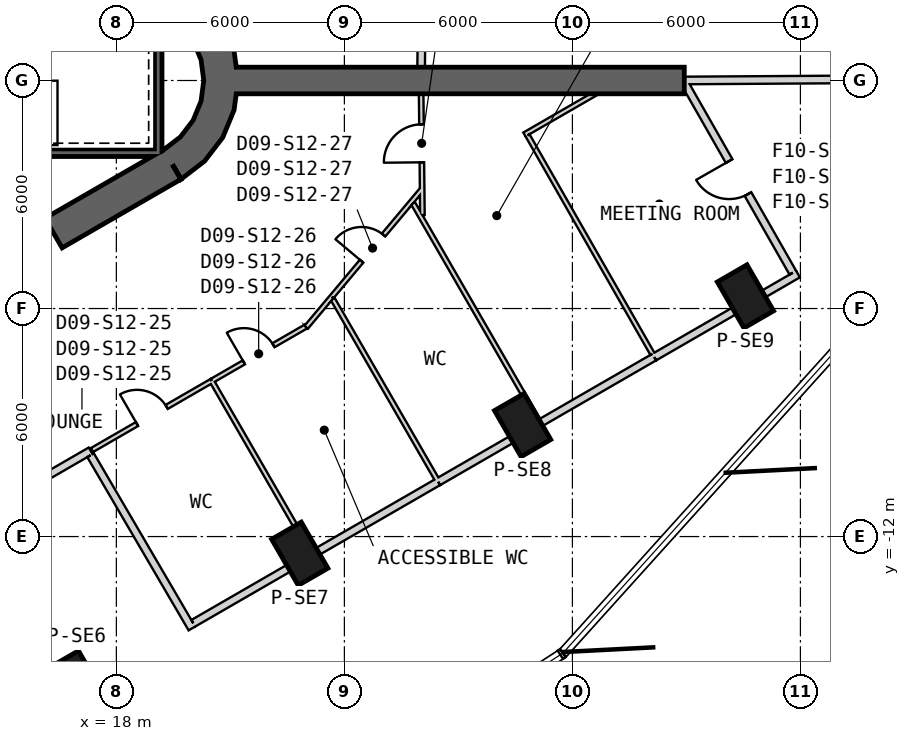
"""IFC4 building model, lengths in metres.
Left out: names, types, materials, properties, quantities, classifications, styles, units other than length and angle.
Written with IfcOpenShell. Run it as: python <this file> out.ifc"""

import sys

from ifc_helpers import new_model, si_unit, direction, frame, frame_2d, origin, origin_2d, place, context, subcontext, project, spatial, polyline, rectangle, outline, extrude, element, fill, save


model = new_model("IFC4")
c1 = context("Model", 3, precision=1e-05, world=origin(), true_north=direction((0.0, 1.0)))
c2 = subcontext(c1, "Body", "Model", "MODEL_VIEW")
j1 = project(units=[si_unit("LENGTHUNIT", "METRE"), si_unit("PLANEANGLEUNIT", "RADIAN")], contexts=[c1])
p1 = place(None, origin())
s1 = spatial("IfcSite", under=j1, at=p1, CompositionType="ELEMENT")
p2 = place(p1, origin())
s2 = spatial("IfcBuilding", under=s1, at=p2, CompositionType="ELEMENT")
p3 = place(p2, frame((0.0, 0.0, 205.2)))
s3 = spatial("IfcBuildingStorey", under=s2, at=p3, CompositionType="ELEMENT", Elevation=205.2)
for number, where, z_axis, x_axis in (
    (1, (16.962, -15.838, 0.0), (0.0, 0.0, 1.0), (0.5, -0.866, 0.0)),
    (2, (22.826, -12.452, 0.0), (0.0, 0.0, 1.0), (0.5, -0.866, 0.0)),
    (3, (28.69, -9.067, 0.0), (0.0, 0.0, 1.0), (0.5, -0.866, 0.0)),
    (4, (34.554, -5.681, 0.0), (0.0, 0.0, 1.0), (0.5, -0.866, 0.0)),
):
    element("IfcColumn", number, at=place(p3, frame(where, z_axis=z_axis, x_axis=x_axis)), inside=s3, PredefinedType="COLUMN", context=c2, shape_type="SweptSolid", body=[
        extrude(rectangle(XDim=1.4, YDim=0.9, at=origin_2d()), origin(), (0.0, 0.0, 1.0), 4.0),
    ])
p4 = place(p3, frame((-7.825, -17.97, 0.0), z_axis=(0.0, 0.0, 1.0), x_axis=(0.866028369851, 0.499994862586, 0.0)))
e5 = element("IfcWall", 5, at=p4, inside=s3, PredefinedType="SHEAR", context=c2, shape_type="SweptSolid", body=[
    extrude(rectangle(XDim=31.523, YDim=0.9, at=frame_2d((15.762, 0.0))), origin(), (0.0, 0.0, 1.0), 4.0),
])
p5 = place(p4, frame((7.062, 0.0, 0.0)))
e6 = element("IfcOpeningElement", 6, at=p5, cuts=e5, PredefinedType="OPENING", context=c2, shape_type="SweptSolid", body=[
    extrude(rectangle(XDim=1.2, YDim=2.4, at=frame_2d((0.6, 1.2))), frame((0.0, 0.46, 0.0), z_axis=(0.0, -1.0, 0.0), x_axis=(1.0, 0.0, 0.0)), (0.0, 0.0, 1.0), 0.92),
])
p6 = place(p4, frame((9.762, 0.0, 0.0)))
e7 = element("IfcOpeningElement", 7, at=p6, cuts=e5, PredefinedType="OPENING", context=c2, shape_type="SweptSolid", body=[
    extrude(rectangle(XDim=1.2, YDim=2.4, at=frame_2d((0.6, 1.2))), frame((0.0, 0.46, 0.0), z_axis=(0.0, -1.0, 0.0), x_axis=(1.0, 0.0, 0.0)), (0.0, 0.0, 1.0), 0.92),
])
p7 = place(p4, frame((12.462, 0.0, 0.0)))
e8 = element("IfcOpeningElement", 8, at=p7, cuts=e5, PredefinedType="OPENING", context=c2, shape_type="SweptSolid", body=[
    extrude(rectangle(XDim=1.2, YDim=2.4, at=frame_2d((0.6, 1.2))), frame((0.0, 0.46, 0.0), z_axis=(0.0, -1.0, 0.0), x_axis=(1.0, 0.0, 0.0)), (0.0, 0.0, 1.0), 0.92),
])
p8 = place(p4, frame((15.162, 0.0, 0.0)))
e9 = element("IfcOpeningElement", 9, at=p8, cuts=e5, PredefinedType="OPENING", context=c2, shape_type="SweptSolid", body=[
    extrude(rectangle(XDim=1.2, YDim=2.4, at=frame_2d((0.6, 1.2))), frame((0.0, 0.46, 0.0), z_axis=(0.0, -1.0, 0.0), x_axis=(1.0, 0.0, 0.0)), (0.0, 0.0, 1.0), 0.92),
])
p9 = place(p4, frame((17.862, 0.0, 0.0)))
e10 = element("IfcOpeningElement", 10, at=p9, cuts=e5, PredefinedType="OPENING", context=c2, shape_type="SweptSolid", body=[
    extrude(rectangle(XDim=1.2, YDim=2.4, at=frame_2d((0.6, 1.2))), frame((0.0, 0.46, 0.0), z_axis=(0.0, -1.0, 0.0), x_axis=(1.0, 0.0, 0.0)), (0.0, 0.0, 1.0), 0.92),
])
p10 = place(p4, frame((20.562, 0.0, 0.0)))
e11 = element("IfcOpeningElement", 11, at=p10, cuts=e5, PredefinedType="OPENING", context=c2, shape_type="SweptSolid", body=[
    extrude(rectangle(XDim=1.2, YDim=2.4, at=frame_2d((0.6, 1.2))), frame((0.0, 0.46, 0.0), z_axis=(0.0, -1.0, 0.0), x_axis=(1.0, 0.0, 0.0)), (0.0, 0.0, 1.0), 0.92),
])
p11 = place(p4, frame((26.712, 0.0, 0.0)))
e12 = element("IfcOpeningElement", 12, at=p11, cuts=e5, PredefinedType="OPENING", context=c2, shape_type="SweptSolid", body=[
    extrude(rectangle(XDim=1.2, YDim=2.4, at=frame_2d((0.6, 1.2))), frame((0.0, 0.46, 0.0), z_axis=(0.0, -1.0, 0.0), x_axis=(1.0, 0.0, 0.0)), (0.0, 0.0, 1.0), 0.92),
])
p12 = place(p4, frame((3.612, 0.0, 0.0)))
e13 = element("IfcOpeningElement", 13, at=p12, cuts=e5, PredefinedType="OPENING", context=c2, shape_type="SweptSolid", body=[
    extrude(rectangle(XDim=1.2, YDim=2.4, at=frame_2d((0.6, 1.2))), frame((0.0, 0.46, 0.0), z_axis=(0.0, -1.0, 0.0), x_axis=(1.0, 0.0, 0.0)), (0.0, 0.0, 1.0), 0.92),
])
p13 = place(p3, origin())
e14 = element("IfcWall", 14, at=p13, inside=s3, PredefinedType="SHEAR", context=c2, shape_type="SweptSolid", body=[
    extrude(outline(polyline([(19.7, -2.598), (20.321, -2.121), (20.798, -1.5), (21.098, -0.777), (21.2, 0.0), (21.098, 0.777), (20.798, 1.5), (20.321, 2.121), (19.7, 2.598), (19.25, 1.819), (19.685, 1.485), (20.019, 1.05), (20.229, 0.543), (20.3, 0.0), (20.229, -0.543), (20.019, -1.05), (19.685, -1.485), (19.25, -1.819), (19.7, -2.598)])), origin(), (0.0, 0.0, 1.0), 4.0),
])
p14 = place(p3, frame((21.15, 0.0, 0.0), z_axis=(0.0, 0.0, 1.0), x_axis=(1.0, 0.0, 0.0)))
e15 = element("IfcWall", 15, at=p14, inside=s3, PredefinedType="SHEAR", context=c2, shape_type="SweptSolid", body=[
    extrude(rectangle(XDim=11.794, YDim=0.7, at=frame_2d((5.897, 0.0))), origin(), (0.0, 0.0, 1.0), 4.0),
])
p15 = place(p3, frame((19.1, -2.0, -0.3), z_axis=(0.0, 0.0, 1.0), x_axis=(0.0, 1.0, 0.0)))
e16 = element("IfcWall", 16, at=p15, inside=s3, PredefinedType="SHEAR", context=c2, shape_type="SweptSolid", body=[
    extrude(rectangle(XDim=3.8, YDim=0.2, at=frame_2d((1.9, 0.0))), origin(), (0.0, 0.0, 1.0), 4.0),
])
p16 = place(p3, frame((11.1, -1.9, -0.3), z_axis=(0.0, 0.0, 1.0), x_axis=(1.0, 0.0, 0.0)))
e17 = element("IfcWall", 17, at=p16, inside=s3, PredefinedType="SHEAR", context=c2, shape_type="SweptSolid", body=[
    extrude(rectangle(XDim=7.9, YDim=0.2, at=frame_2d((3.95, 0.0))), origin(), (0.0, 0.0, 1.0), 4.0),
])
p17 = place(p3, frame((26.02, 0.35, 0.0), z_axis=(0.0, 0.0, 1.0), x_axis=(0.010532007244, 0.999944536874, 0.0)))
e18 = element("IfcWall", 18, at=p17, inside=s3, PredefinedType="PARTITIONING", context=c2, shape_type="SweptSolid", body=[
    extrude(rectangle(XDim=2.457, YDim=0.2, at=frame_2d((1.229, 0.0))), origin(), (0.0, 0.0, 1.0), 3.7),
])
p18 = place(p3, frame((6.775, -15.834, 0.0), z_axis=(0.0, 0.0, 1.0), x_axis=(0.86602903513, 0.499993710272, 0.0)))
e19 = element("IfcWall", 19, at=p18, inside=s3, PredefinedType="PARTITIONING", context=c2, shape_type="SweptSolid", body=[
    extrude(rectangle(XDim=12.18, YDim=0.2, at=frame_2d((6.09, 0.0))), origin(), (0.0, 0.0, 1.0), 3.07),
])
p19 = place(p3, frame((17.357, -9.724, 0.0), z_axis=(0.0, 0.0, 1.0), x_axis=(0.866021334019, 0.500007048974, 0.0)))
e20 = element("IfcWall", 20, at=p19, inside=s3, PredefinedType="PARTITIONING", context=c2, shape_type="SweptSolid", body=[
    extrude(rectangle(XDim=3.639, YDim=0.12, at=frame_2d((1.819, 0.0))), origin(), (0.0, 0.0, 1.0), 2.98),
])
p20 = place(p19, frame((1.369, 0.0, 0.0)))
e21 = element("IfcOpeningElement", 21, at=p20, cuts=e20, PredefinedType="OPENING", context=c2, shape_type="SweptSolid", body=[
    extrude(rectangle(XDim=0.9, YDim=2.1, at=frame_2d((0.45, 1.05))), frame((0.0, 0.07, 0.0), z_axis=(0.0, -1.0, 0.0), x_axis=(1.0, 0.0, 0.0)), (0.0, 0.0, 1.0), 0.14),
])
p21 = place(p3, frame((20.509, -7.905, 0.0), z_axis=(0.0, 0.0, 1.0), x_axis=(0.866028890243, 0.499993961228, 0.0)))
e22 = element("IfcWall", 22, at=p21, inside=s3, PredefinedType="PARTITIONING", context=c2, shape_type="SweptSolid", body=[
    extrude(rectangle(XDim=2.854, YDim=0.12, at=frame_2d((1.427, 0.0))), origin(), (0.0, 0.0, 1.0), 2.88),
])
p22 = place(p21, frame((0.977, 0.0, 0.0)))
e23 = element("IfcOpeningElement", 23, at=p22, cuts=e22, PredefinedType="OPENING", context=c2, shape_type="SweptSolid", body=[
    extrude(rectangle(XDim=0.9, YDim=2.1, at=frame_2d((0.45, 1.05))), frame((0.0, 0.07, 0.0), z_axis=(0.0, -1.0, 0.0), x_axis=(1.0, 0.0, 0.0)), (0.0, 0.0, 1.0), 0.14),
])
p23 = place(p3, frame((22.994, -6.494, 0.0), z_axis=(0.0, 0.0, 1.0), x_axis=(0.642788403247, 0.766043777242, 0.0)))
e24 = element("IfcWall", 24, at=p23, inside=s3, PredefinedType="PARTITIONING", context=c2, shape_type="SweptSolid", body=[
    extrude(rectangle(XDim=1.05, YDim=0.12, at=frame_2d((0.525, 0.0))), origin(), (0.0, 0.0, 1.0), 3.7),
])
p24 = place(p3, frame((23.668, -5.689, 0.0), z_axis=(0.0, 0.0, 1.0), x_axis=(0.642770978045, 0.766058398416, 0.0)))
e25 = element("IfcWall", 25, at=p24, inside=s3, PredefinedType="PARTITIONING", context=c2, shape_type="SweptSolid", body=[
    extrude(rectangle(XDim=3.699, YDim=0.12, at=frame_2d((1.85, 0.0))), origin(), (0.0, 0.0, 1.0), 2.78),
])
p25 = place(p24, frame((1.22, 0.0, 0.0)))
e26 = element("IfcOpeningElement", 26, at=p25, cuts=e25, PredefinedType="OPENING", context=c2, shape_type="SweptSolid", body=[
    extrude(rectangle(XDim=0.9, YDim=2.1, at=frame_2d((0.45, 1.05))), frame((0.0, 0.07, 0.0), z_axis=(0.0, -1.0, 0.0), x_axis=(1.0, 0.0, 0.0)), (0.0, 0.0, 1.0), 0.14),
])
p26 = place(p3, frame((26.053, -3.54, 0.0), z_axis=(0.0, 0.0, 1.0), x_axis=(-0.010562790974, 0.999944212167, 0.0)))
e27 = element("IfcWall", 27, at=p26, inside=s3, PredefinedType="PARTITIONING", context=c2, shape_type="SweptSolid", body=[
    extrude(rectangle(XDim=3.19, YDim=0.12, at=frame_2d((1.595, 0.0))), origin(), (0.0, 0.0, 1.0), 3.7),
])
p27 = place(p26, frame((1.387, 0.0, 0.0)))
e28 = element("IfcOpeningElement", 28, at=p27, cuts=e27, PredefinedType="OPENING", context=c2, shape_type="SweptSolid", body=[
    extrude(rectangle(XDim=1.0, YDim=2.1, at=frame_2d((0.5, 1.05))), frame((0.0, 0.07, 0.0), z_axis=(0.0, -1.0, 0.0), x_axis=(1.0, 0.0, 0.0)), (0.0, 0.0, 1.0), 0.14),
])
p28 = place(p3, frame((32.944, 0.0, 0.0), z_axis=(0.0, 0.0, 1.0), x_axis=(0.999979082064, 0.006468031696, 0.0)))
e29 = element("IfcWall", 29, at=p28, inside=s3, PredefinedType="PARTITIONING", context=c2, shape_type="SweptSolid", body=[
    extrude(rectangle(XDim=4.567, YDim=0.2, at=frame_2d((2.284, 0.0))), origin(), (0.0, 0.0, 1.0), 3.27),
])
p29 = place(p3, frame((17.321, -9.86, 0.0), z_axis=(0.0, 0.0, 1.0), x_axis=(0.5049171161, -0.863167831809, 0.0)))
e30 = element("IfcWall", 30, at=p29, inside=s3, PredefinedType="PARTITIONING", context=c2, shape_type="SweptSolid", body=[
    extrude(rectangle(XDim=5.28, YDim=0.2, at=frame_2d((2.64, 0.0))), origin(), (0.0, 0.0, 1.0), 3.7),
])
p30 = place(p3, frame((35.937, -5.094, 0.0), z_axis=(0.0, 0.0, 1.0), x_axis=(-0.866036659782, -0.499980503534, 0.0)))
e31 = element("IfcWall", 31, at=p30, inside=s3, PredefinedType="PARTITIONING", context=c2, shape_type="SweptSolid", body=[
    extrude(rectangle(XDim=4.368, YDim=0.2, at=frame_2d((2.184, 0.0))), origin(), (0.0, 0.0, 1.0), 3.7),
])
p31 = place(p3, frame((32.154, -7.278, 0.0), z_axis=(0.0, 0.0, 1.0), x_axis=(-0.866015890035, -0.500016477935, 0.0)))
e32 = element("IfcWall", 32, at=p31, inside=s3, PredefinedType="PARTITIONING", context=c2, shape_type="SweptSolid", body=[
    extrude(rectangle(XDim=3.474, YDim=0.2, at=frame_2d((1.737, 0.0))), origin(), (0.0, 0.0, 1.0), 3.7),
])
p32 = place(p3, frame((29.146, -9.015, 0.0), z_axis=(0.0, 0.0, 1.0), x_axis=(-0.866051371129, -0.499955020542, 0.0)))
e33 = element("IfcWall", 33, at=p32, inside=s3, PredefinedType="PARTITIONING", context=c2, shape_type="SweptSolid", body=[
    extrude(rectangle(XDim=3.09, YDim=0.2, at=frame_2d((1.545, 0.0))), origin(), (0.0, 0.0, 1.0), 3.7),
])
p33 = place(p3, frame((26.47, -10.56, 0.0), z_axis=(0.0, 0.0, 1.0), x_axis=(-0.866017015294, -0.50001452901, 0.0)))
e34 = element("IfcWall", 34, at=p33, inside=s3, PredefinedType="PARTITIONING", context=c2, shape_type="SweptSolid", body=[
    extrude(rectangle(XDim=3.835, YDim=0.2, at=frame_2d((1.917, 0.0))), origin(), (0.0, 0.0, 1.0), 3.7),
])
p34 = place(p3, frame((23.149, -12.477, 0.0), z_axis=(0.0, 0.0, 1.0), x_axis=(-0.866015466884, -0.500017210822, 0.0)))
e35 = element("IfcWall", 35, at=p34, inside=s3, PredefinedType="PARTITIONING", context=c2, shape_type="SweptSolid", body=[
    extrude(rectangle(XDim=3.609, YDim=0.2, at=frame_2d((1.804, 0.0))), origin(), (0.0, 0.0, 1.0), 3.7),
])
p35 = place(p3, frame((35.801, -5.057, 0.0), z_axis=(0.0, 0.0, 1.0), x_axis=(-0.495623394513, 0.868537535637, 0.0)))
e36 = element("IfcWall", 36, at=p35, inside=s3, PredefinedType="PARTITIONING", context=c2, shape_type="SweptSolid", body=[
    extrude(rectangle(XDim=5.764, YDim=0.2, at=frame_2d((2.882, 0.0))), origin(), (0.0, 0.0, 1.0), 3.27),
])
p36 = place(p35, frame((2.382, 0.0, 0.0)))
e37 = element("IfcOpeningElement", 37, at=p36, cuts=e36, PredefinedType="OPENING", context=c2, shape_type="SweptSolid", body=[
    extrude(rectangle(XDim=1.0, YDim=2.1, at=frame_2d((0.5, 1.05))), frame((0.0, 0.11, 0.0), z_axis=(0.0, -1.0, 0.0), x_axis=(1.0, 0.0, 0.0)), (0.0, 0.0, 1.0), 0.22),
])
p37 = place(p3, frame((20.539, -7.957, 0.0), z_axis=(0.0, 0.0, 1.0), x_axis=(0.500026528015, -0.866010087286, 0.0)))
e38 = element("IfcWall", 38, at=p37, inside=s3, PredefinedType="PARTITIONING", context=c2, shape_type="SweptSolid", body=[
    extrude(rectangle(XDim=5.12, YDim=0.12, at=frame_2d((2.56, 0.0))), origin(), (0.0, 0.0, 1.0), 3.7),
])
p38 = place(p3, frame((26.42, -10.473, 0.0), z_axis=(0.0, 0.0, 1.0), x_axis=(-0.499992537871, 0.866029712004, 0.0)))
e39 = element("IfcWall", 39, at=p38, inside=s3, PredefinedType="PARTITIONING", context=c2, shape_type="SweptSolid", body=[
    extrude(rectangle(XDim=5.451, YDim=0.12, at=frame_2d((2.726, 0.0))), origin(), (0.0, 0.0, 1.0), 2.88),
])
p39 = place(p3, frame((25.808, -3.234, 0.0), z_axis=(0.0, 0.0, 1.0), x_axis=(0.499992415469, -0.866029782671, 0.0)))
e40 = element("IfcWall", 40, at=p39, inside=s3, PredefinedType="PARTITIONING", context=c2, shape_type="SweptSolid", body=[
    extrude(rectangle(XDim=6.576, YDim=0.12, at=frame_2d((3.288, 0.0))), origin(), (0.0, 0.0, 1.0), 2.78),
])
p40 = place(p3, frame((30.594, -0.35, 0.0), z_axis=(0.0, 0.0, 1.0), x_axis=(-0.86604708139, -0.499962451406, 0.0)))
e41 = element("IfcWall", 41, at=p40, inside=s3, PredefinedType="PARTITIONING", context=c2, shape_type="SweptSolid", body=[
    extrude(rectangle(XDim=2.143, YDim=0.12, at=frame_2d((1.071, 0.0))), origin(), (0.0, 0.0, 1.0), 3.7),
])
p41 = place(p3, frame((32.104, -7.191, 0.0), z_axis=(0.0, 0.0, 1.0), x_axis=(-0.496162767327, 0.868229525136, 0.0)))
e42 = element("IfcWall", 42, at=p41, inside=s3, PredefinedType="PARTITIONING", context=c2, shape_type="SweptSolid", body=[
    extrude(rectangle(XDim=6.62, YDim=0.12, at=frame_2d((3.31, 0.0))), origin(), (0.0, 0.0, 1.0), 2.78),
])
p42 = place(p20, origin())
e43 = element("IfcDoor", 43, at=p42, inside=s3, OperationType="SINGLE_SWING_LEFT", PredefinedType="NOTDEFINED", context=c2, shape_type="SweptSolid", body=[
    extrude(rectangle(XDim=0.9, YDim=2.1, at=frame_2d((0.45, 1.05))), frame((0.0, 0.025, 0.0), z_axis=(0.0, -1.0, 0.0), x_axis=(1.0, 0.0, 0.0)), (0.0, 0.0, 1.0), 0.05),
])
fill(e21, e43)
p43 = place(p22, origin())
e44 = element("IfcDoor", 44, at=p43, inside=s3, OperationType="SINGLE_SWING_LEFT", PredefinedType="NOTDEFINED", context=c2, shape_type="SweptSolid", body=[
    extrude(rectangle(XDim=0.9, YDim=2.1, at=frame_2d((0.45, 1.05))), frame((0.0, 0.025, 0.0), z_axis=(0.0, -1.0, 0.0), x_axis=(1.0, 0.0, 0.0)), (0.0, 0.0, 1.0), 0.05),
])
fill(e23, e44)
p44 = place(p25, origin())
e45 = element("IfcDoor", 45, at=p44, inside=s3, OperationType="SINGLE_SWING_LEFT", PredefinedType="NOTDEFINED", context=c2, shape_type="SweptSolid", body=[
    extrude(rectangle(XDim=0.9, YDim=2.1, at=frame_2d((0.45, 1.05))), frame((0.0, 0.025, 0.0), z_axis=(0.0, -1.0, 0.0), x_axis=(1.0, 0.0, 0.0)), (0.0, 0.0, 1.0), 0.05),
])
fill(e26, e45)
p45 = place(p27, origin())
e46 = element("IfcDoor", 46, at=p45, inside=s3, OperationType="SINGLE_SWING_RIGHT", PredefinedType="NOTDEFINED", context=c2, shape_type="SweptSolid", body=[
    extrude(rectangle(XDim=1.0, YDim=2.1, at=frame_2d((0.5, 1.05))), frame((0.0, 0.025, 0.0), z_axis=(0.0, -1.0, 0.0), x_axis=(1.0, 0.0, 0.0)), (0.0, 0.0, 1.0), 0.05),
])
fill(e28, e46)
p46 = place(p36, origin())
e47 = element("IfcDoor", 47, at=p46, inside=s3, OperationType="SINGLE_SWING_LEFT", PredefinedType="USERDEFINED", context=c2, shape_type="SweptSolid", body=[
    extrude(rectangle(XDim=1.0, YDim=2.1, at=frame_2d((0.5, 1.05))), frame((0.0, 0.025, 0.0), z_axis=(0.0, -1.0, 0.0), x_axis=(1.0, 0.0, 0.0)), (0.0, 0.0, 1.0), 0.05),
])
fill(e37, e47)
p47 = place(p11, origin())
e48 = element("IfcDoor", 48, at=p47, inside=s3, OperationType="SINGLE_SWING_RIGHT", PredefinedType="USERDEFINED", context=c2, shape_type="SweptSolid", body=[
    extrude(rectangle(XDim=1.2, YDim=2.4, at=frame_2d((0.6, 1.2))), frame((0.0, 0.025, 0.0), z_axis=(0.0, -1.0, 0.0), x_axis=(1.0, 0.0, 0.0)), (0.0, 0.0, 1.0), 0.05),
])
fill(e12, e48)
save(model, sys.argv[1])
